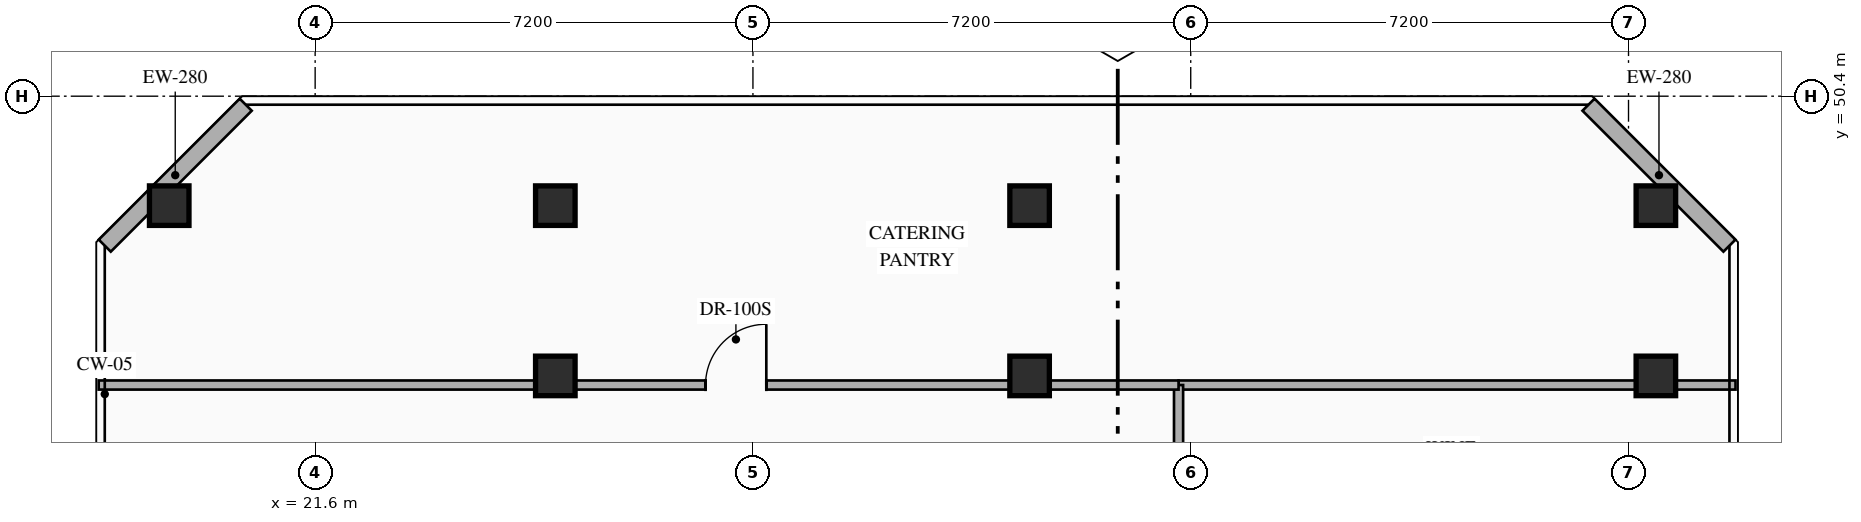
"""IFC4 building model, lengths in metres.
Left out: names, types, materials, properties, quantities, classifications, styles, units other than length and angle.
Written with IfcOpenShell. Run it as: python <this file> out.ifc"""

import sys

from ifc_helpers import new_model, si_unit, direction, frame, frame_2d, origin, origin_2d, place, context, subcontext, project, spatial, rectangle, hollow_rectangle, extrude, element, fill, save


model = new_model("IFC4")
c1 = context("Model", 3, precision=1e-05, world=origin(), true_north=direction((0.0, 1.0)))
c2 = subcontext(c1, "Body", "Model", "MODEL_VIEW")
j1 = project(units=[si_unit("LENGTHUNIT", "METRE"), si_unit("PLANEANGLEUNIT", "RADIAN")], contexts=[c1])
p1 = place(None, origin())
s1 = spatial("IfcSite", under=j1, at=p1, CompositionType="ELEMENT")
p2 = place(p1, origin())
s2 = spatial("IfcBuilding", under=s1, at=p2, CompositionType="ELEMENT")
p3 = place(p2, frame((0.0, 0.0, 257.55)))
s3 = spatial("IfcBuildingStorey", under=s2, at=p3, CompositionType="ELEMENT", Elevation=257.55)
for number, where, z_axis, x_axis in (
    (1, (25.55, 45.8, 0.0), (0.0, 0.0, 1.0), (1.0, 0.0, 0.0)),
    (2, (33.35, 45.8, 0.0), (0.0, 0.0, 1.0), (1.0, 0.0, 0.0)),
    (3, (43.65, 45.8, 0.0), (0.0, 0.0, 1.0), (1.0, 0.0, 0.0)),
    (4, (19.2, 48.6, 0.0), (0.0, 0.0, 1.0), (1.0, 0.0, 0.0)),
    (5, (25.55, 48.6, 0.0), (0.0, 0.0, 1.0), (1.0, 0.0, 0.0)),
    (6, (33.35, 48.6, 0.0), (0.0, 0.0, 1.0), (1.0, 0.0, 0.0)),
    (7, (43.65, 48.6, 0.0), (0.0, 0.0, 1.0), (1.0, 0.0, 0.0)),
):
    element("IfcColumn", number, at=place(p3, frame(where, z_axis=z_axis, x_axis=x_axis)), inside=s3, PredefinedType="COLUMN", context=c2, shape_type="SweptSolid", body=[
        extrude(hollow_rectangle(XDim=0.65, YDim=0.65, WallThickness=0.025, at=origin_2d()), origin(), (0.0, 0.0, 1.0), 4.2),
    ])
for number, where, z_axis, x_axis in (
    (8, (18.14, 47.942, 0.0), (0.0, 0.0, 1.0), (0.707, 0.707, 0.0)),
    (9, (42.542, 50.26, 0.0), (0.0, 0.0, 1.0), (0.707, -0.707, 0.0)),
):
    element("IfcWall", number, at=place(p3, frame(where, z_axis=z_axis, x_axis=x_axis)), inside=s3, PredefinedType="STANDARD", context=c2, shape_type="SweptSolid", body=[
        extrude(rectangle(XDim=3.278, YDim=0.28, at=frame_2d((1.639, 0.0))), origin(), (0.0, 0.0, 1.0), 3.95),
    ])
p4 = place(p3, frame((35.8, 45.65, 0.0), z_axis=(0.0, 0.0, 1.0), x_axis=(1.0, 0.0, 0.0)))
e10 = element("IfcWall", 10, at=p4, inside=s3, PredefinedType="PARTITIONING", context=c2, shape_type="SweptSolid", body=[
    extrude(rectangle(XDim=9.16, YDim=0.15, at=frame_2d((4.58, 0.0))), origin(), (0.0, 0.0, 1.0), 3.357),
])
p5 = place(p3, frame((35.8, 42.65, 0.0), z_axis=(0.0, 0.0, 1.0), x_axis=(0.0, 1.0, 0.0)))
e11 = element("IfcWall", 11, at=p5, inside=s3, PredefinedType="PARTITIONING", context=c2, shape_type="SweptSolid", body=[
    extrude(rectangle(XDim=3.0, YDim=0.15, at=frame_2d((1.5, 0.0))), origin(), (0.0, 0.0, 1.0), 3.95),
])
p6 = place(p5, frame((1.025, 0.0, 0.0)))
e12 = element("IfcOpeningElement", 12, at=p6, cuts=e11, PredefinedType="OPENING", context=c2, shape_type="SweptSolid", body=[
    extrude(rectangle(XDim=0.95, YDim=2.15, at=frame_2d((0.475, 1.075))), frame((0.0, 0.085, 0.0), z_axis=(0.0, -1.0, 0.0), x_axis=(1.0, 0.0, 0.0)), (0.0, 0.0, 1.0), 0.17),
])
p7 = place(p3, frame((18.04, 45.65, 0.0), z_axis=(0.0, 0.0, 1.0), x_axis=(1.0, 0.0, 0.0)))
e13 = element("IfcWall", 13, at=p7, inside=s3, PredefinedType="PARTITIONING", context=c2, shape_type="SweptSolid", body=[
    extrude(rectangle(XDim=17.76, YDim=0.15, at=frame_2d((8.88, 0.0))), origin(), (0.0, 0.0, 1.0), 3.357),
])
p8 = place(p7, frame((9.98, 0.0, 0.0)))
e14 = element("IfcOpeningElement", 14, at=p8, cuts=e13, PredefinedType="OPENING", context=c2, shape_type="SweptSolid", body=[
    extrude(rectangle(XDim=1.0, YDim=2.15, at=frame_2d((0.5, 1.075))), frame((0.0, 0.085, 0.0), z_axis=(0.0, -1.0, 0.0), x_axis=(1.0, 0.0, 0.0)), (0.0, 0.0, 1.0), 0.17),
])
p9 = place(p8, origin())
e15 = element("IfcDoor", 15, at=p9, inside=s3, OperationType="SINGLE_SWING_RIGHT", PredefinedType="DOOR", context=c2, shape_type="SweptSolid", body=[
    extrude(rectangle(XDim=1.0, YDim=2.15, at=frame_2d((0.5, 1.075))), frame((0.0, 0.025, 0.0), z_axis=(0.0, -1.0, 0.0), x_axis=(1.0, 0.0, 0.0)), (0.0, 0.0, 1.0), 0.05),
])
fill(e14, e15)
save(model, sys.argv[1])
